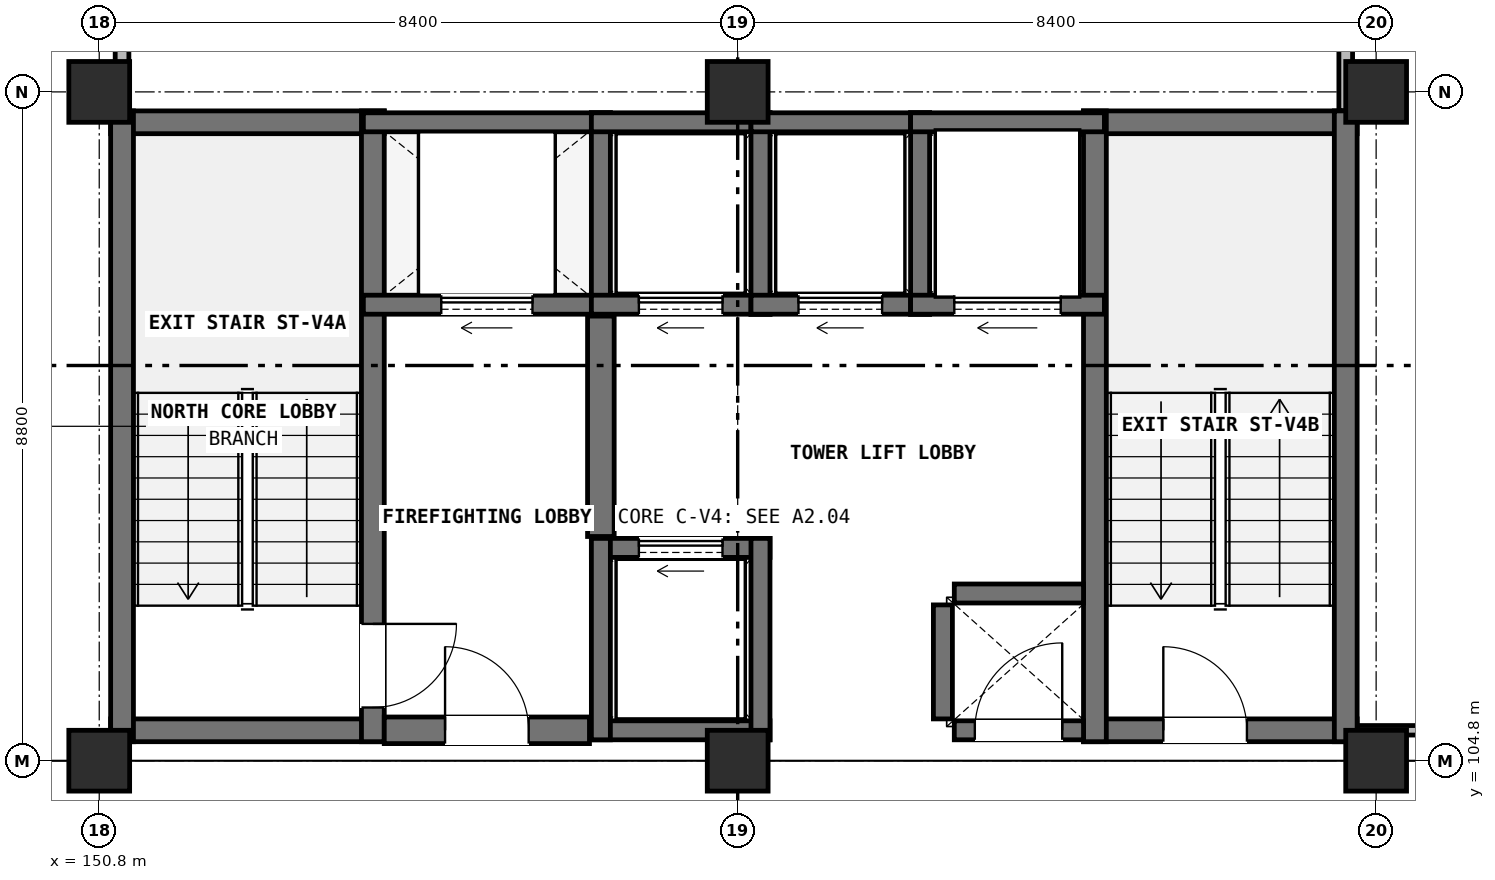
"""IFC4 building model, lengths in metres.
Left out: names, types, materials, properties, quantities, classifications, styles, units other than length and angle.
Written with IfcOpenShell. Run it as: python <this file> out.ifc"""

import sys

from ifc_helpers import new_model, si_unit, direction, frame, frame_2d, origin, origin_2d, place, context, subcontext, project, spatial, rectangle, extrude, element, fill, save


model = new_model("IFC4")
c1 = context("Model", 3, precision=1e-05, world=origin(), true_north=direction((0.0, 1.0)))
c2 = subcontext(c1, "Body", "Model", "MODEL_VIEW")
j1 = project(units=[si_unit("LENGTHUNIT", "METRE"), si_unit("PLANEANGLEUNIT", "RADIAN")], contexts=[c1])
p1 = place(None, origin())
s1 = spatial("IfcSite", under=j1, at=p1, CompositionType="ELEMENT")
p2 = place(p1, origin())
s2 = spatial("IfcBuilding", under=s1, at=p2, CompositionType="ELEMENT")
p3 = place(p2, frame((0.0, 0.0, 17.2)))
s3 = spatial("IfcBuildingStorey", under=s2, at=p3, CompositionType="ELEMENT", Elevation=17.2)
for number, where, z_axis, x_axis in (
    (1, (150.8, 104.8, 0.0), (0.0, 0.0, 1.0), (1.0, 0.0, 0.0)),
    (2, (150.8, 113.6, 0.0), (0.0, 0.0, 1.0), (1.0, 0.0, 0.0)),
    (3, (159.2, 104.8, 0.0), (0.0, 0.0, 1.0), (1.0, 0.0, 0.0)),
    (4, (159.2, 113.6, 0.0), (0.0, 0.0, 1.0), (1.0, 0.0, 0.0)),
    (5, (167.6, 104.8, 0.0), (0.0, 0.0, 1.0), (1.0, 0.0, 0.0)),
    (6, (167.6, 113.6, 0.0), (0.0, 0.0, 1.0), (1.0, 0.0, 0.0)),
):
    element("IfcColumn", number, at=place(p3, frame(where, z_axis=z_axis, x_axis=x_axis)), inside=s3, PredefinedType="COLUMN", context=c2, shape_type="SweptSolid", body=[
        extrude(rectangle(XDim=0.8, YDim=0.8, at=origin_2d()), origin(), (0.0, 0.0, 1.0), 3.8),
    ])
for number, where, z_axis, x_axis in (
    (7, (150.95, 105.2, 0.0), (0.0, 0.0, 1.0), (1.0, 0.0, 0.0)),
    (8, (150.95, 113.2, 0.0), (0.0, 0.0, 1.0), (1.0, 0.0, 0.0)),
):
    element("IfcWall", number, at=place(p3, frame(where, z_axis=z_axis, x_axis=x_axis)), inside=s3, PredefinedType="SHEAR", context=c2, shape_type="SweptSolid", body=[
        extrude(rectangle(XDim=3.6, YDim=0.3, at=frame_2d((1.8, 0.0))), origin(), (0.0, 0.0, 1.0), 3.8),
    ])
p4 = place(p3, frame((151.1, 105.05, 0.0), z_axis=(0.0, 0.0, 1.0), x_axis=(0.0, 1.0, 0.0)))
e9 = element("IfcWall", 9, at=p4, inside=s3, PredefinedType="SHEAR", context=c2, shape_type="SweptSolid", body=[
    extrude(rectangle(XDim=8.3, YDim=0.3, at=frame_2d((4.15, 0.0))), origin(), (0.0, 0.0, 1.0), 3.8),
])
p5 = place(p3, frame((154.4, 105.05, 0.0), z_axis=(0.0, 0.0, 1.0), x_axis=(0.0, 1.0, 0.0)))
e10 = element("IfcWall", 10, at=p5, inside=s3, PredefinedType="SHEAR", context=c2, shape_type="SweptSolid", body=[
    extrude(rectangle(XDim=8.3, YDim=0.3, at=frame_2d((4.15, 0.0))), origin(), (0.0, 0.0, 1.0), 3.8),
])
p6 = place(p5, frame((0.45, 0.0, 0.0)))
e11 = element("IfcOpeningElement", 11, at=p6, cuts=e10, PredefinedType="OPENING", context=c2, shape_type="SweptSolid", body=[
    extrude(rectangle(XDim=1.1, YDim=2.2, at=frame_2d((0.55, 1.1))), frame((0.0, 0.16, 0.0), z_axis=(0.0, -1.0, 0.0), x_axis=(1.0, 0.0, 0.0)), (0.0, 0.0, 1.0), 0.32),
])
p7 = place(p3, frame((163.75, 105.2, 0.0), z_axis=(0.0, 0.0, 1.0), x_axis=(1.0, 0.0, 0.0)))
e12 = element("IfcWall", 12, at=p7, inside=s3, PredefinedType="SHEAR", context=c2, shape_type="SweptSolid", body=[
    extrude(rectangle(XDim=3.6, YDim=0.3, at=frame_2d((1.8, 0.0))), origin(), (0.0, 0.0, 1.0), 3.8),
])
p8 = place(p7, frame((1.05, 0.0, 0.0)))
e13 = element("IfcOpeningElement", 13, at=p8, cuts=e12, PredefinedType="OPENING", context=c2, shape_type="SweptSolid", body=[
    extrude(rectangle(XDim=1.1, YDim=2.2, at=frame_2d((0.55, 1.1))), frame((0.0, 0.16, 0.0), z_axis=(0.0, -1.0, 0.0), x_axis=(1.0, 0.0, 0.0)), (0.0, 0.0, 1.0), 0.32),
])
p9 = place(p3, frame((163.75, 113.2, 0.0), z_axis=(0.0, 0.0, 1.0), x_axis=(1.0, 0.0, 0.0)))
e14 = element("IfcWall", 14, at=p9, inside=s3, PredefinedType="SHEAR", context=c2, shape_type="SweptSolid", body=[
    extrude(rectangle(XDim=3.6, YDim=0.3, at=frame_2d((1.8, 0.0))), origin(), (0.0, 0.0, 1.0), 3.8),
])
for number, where, z_axis, x_axis in (
    (15, (163.9, 105.05, 0.0), (0.0, 0.0, 1.0), (0.0, 1.0, 0.0)),
    (16, (167.2, 105.05, 0.0), (0.0, 0.0, 1.0), (0.0, 1.0, 0.0)),
):
    element("IfcWall", number, at=place(p3, frame(where, z_axis=z_axis, x_axis=x_axis)), inside=s3, PredefinedType="SHEAR", context=c2, shape_type="SweptSolid", body=[
        extrude(rectangle(XDim=8.3, YDim=0.3, at=frame_2d((4.15, 0.0))), origin(), (0.0, 0.0, 1.0), 3.8),
    ])
p10 = place(p3, frame((154.275, 110.8, 0.0), z_axis=(0.0, 0.0, 1.0), x_axis=(1.0, 0.0, 0.0)))
e17 = element("IfcWall", 17, at=p10, inside=s3, PredefinedType="SOLIDWALL", context=c2, shape_type="SweptSolid", body=[
    extrude(rectangle(XDim=3.25, YDim=0.25, at=frame_2d((1.625, 0.0))), origin(), (0.0, 0.0, 1.0), 3.48),
])
p11 = place(p10, frame((1.025, 0.0, 0.0)))
e18 = element("IfcOpeningElement", 18, at=p11, cuts=e17, PredefinedType="OPENING", context=c2, shape_type="SweptSolid", body=[
    extrude(rectangle(XDim=1.2, YDim=2.2, at=frame_2d((0.6, 1.1))), frame((0.0, 0.135, 0.0), z_axis=(0.0, -1.0, 0.0), x_axis=(1.0, 0.0, 0.0)), (0.0, 0.0, 1.0), 0.27),
])
p12 = place(p3, frame((154.275, 113.2, 0.0), z_axis=(0.0, 0.0, 1.0), x_axis=(1.0, 0.0, 0.0)))
e19 = element("IfcWall", 19, at=p12, inside=s3, PredefinedType="SOLIDWALL", context=c2, shape_type="SweptSolid", body=[
    extrude(rectangle(XDim=3.25, YDim=0.25, at=frame_2d((1.625, 0.0))), origin(), (0.0, 0.0, 1.0), 3.48),
])
p13 = place(p3, frame((157.4, 110.675, 0.0), z_axis=(0.0, 0.0, 1.0), x_axis=(0.0, 1.0, 0.0)))
e20 = element("IfcWall", 20, at=p13, inside=s3, PredefinedType="SOLIDWALL", context=c2, shape_type="SweptSolid", body=[
    extrude(rectangle(XDim=2.65, YDim=0.25, at=frame_2d((1.325, 0.0))), origin(), (0.0, 0.0, 1.0), 3.48),
])
p14 = place(p3, frame((157.275, 110.8, 0.0), z_axis=(0.0, 0.0, 1.0), x_axis=(1.0, 0.0, 0.0)))
e21 = element("IfcWall", 21, at=p14, inside=s3, PredefinedType="SOLIDWALL", context=c2, shape_type="SweptSolid", body=[
    extrude(rectangle(XDim=2.35, YDim=0.25, at=frame_2d((1.175, 0.0))), origin(), (0.0, 0.0, 1.0), 3.48),
])
p15 = place(p14, frame((0.625, 0.0, 0.0)))
e22 = element("IfcOpeningElement", 22, at=p15, cuts=e21, PredefinedType="OPENING", context=c2, shape_type="SweptSolid", body=[
    extrude(rectangle(XDim=1.1, YDim=2.2, at=frame_2d((0.55, 1.1))), frame((0.0, 0.135, 0.0), z_axis=(0.0, -1.0, 0.0), x_axis=(1.0, 0.0, 0.0)), (0.0, 0.0, 1.0), 0.27),
])
p16 = place(p3, frame((157.275, 113.2, 0.0), z_axis=(0.0, 0.0, 1.0), x_axis=(1.0, 0.0, 0.0)))
e23 = element("IfcWall", 23, at=p16, inside=s3, PredefinedType="SOLIDWALL", context=c2, shape_type="SweptSolid", body=[
    extrude(rectangle(XDim=2.35, YDim=0.25, at=frame_2d((1.175, 0.0))), origin(), (0.0, 0.0, 1.0), 3.48),
])
p17 = place(p3, frame((159.5, 110.675, 0.0), z_axis=(0.0, 0.0, 1.0), x_axis=(0.0, 1.0, 0.0)))
e24 = element("IfcWall", 24, at=p17, inside=s3, PredefinedType="SOLIDWALL", context=c2, shape_type="SweptSolid", body=[
    extrude(rectangle(XDim=2.65, YDim=0.25, at=frame_2d((1.325, 0.0))), origin(), (0.0, 0.0, 1.0), 3.48),
])
p18 = place(p3, frame((159.375, 110.8, 0.0), z_axis=(0.0, 0.0, 1.0), x_axis=(1.0, 0.0, 0.0)))
e25 = element("IfcWall", 25, at=p18, inside=s3, PredefinedType="SOLIDWALL", context=c2, shape_type="SweptSolid", body=[
    extrude(rectangle(XDim=2.35, YDim=0.25, at=frame_2d((1.175, 0.0))), origin(), (0.0, 0.0, 1.0), 3.48),
])
p19 = place(p18, frame((0.625, 0.0, 0.0)))
e26 = element("IfcOpeningElement", 26, at=p19, cuts=e25, PredefinedType="OPENING", context=c2, shape_type="SweptSolid", body=[
    extrude(rectangle(XDim=1.1, YDim=2.2, at=frame_2d((0.55, 1.1))), frame((0.0, 0.135, 0.0), z_axis=(0.0, -1.0, 0.0), x_axis=(1.0, 0.0, 0.0)), (0.0, 0.0, 1.0), 0.27),
])
p20 = place(p3, frame((159.375, 113.2, 0.0), z_axis=(0.0, 0.0, 1.0), x_axis=(1.0, 0.0, 0.0)))
e27 = element("IfcWall", 27, at=p20, inside=s3, PredefinedType="SOLIDWALL", context=c2, shape_type="SweptSolid", body=[
    extrude(rectangle(XDim=2.35, YDim=0.25, at=frame_2d((1.175, 0.0))), origin(), (0.0, 0.0, 1.0), 3.48),
])
p21 = place(p3, frame((161.6, 110.675, 0.0), z_axis=(0.0, 0.0, 1.0), x_axis=(0.0, 1.0, 0.0)))
e28 = element("IfcWall", 28, at=p21, inside=s3, PredefinedType="SOLIDWALL", context=c2, shape_type="SweptSolid", body=[
    extrude(rectangle(XDim=2.65, YDim=0.25, at=frame_2d((1.325, 0.0))), origin(), (0.0, 0.0, 1.0), 3.48),
])
p22 = place(p3, frame((157.275, 105.2, 0.0), z_axis=(0.0, 0.0, 1.0), x_axis=(1.0, 0.0, 0.0)))
e29 = element("IfcWall", 29, at=p22, inside=s3, PredefinedType="SOLIDWALL", context=c2, shape_type="SweptSolid", body=[
    extrude(rectangle(XDim=2.35, YDim=0.25, at=frame_2d((1.175, 0.0))), origin(), (0.0, 0.0, 1.0), 3.48),
])
p23 = place(p3, frame((157.275, 107.6, 0.0), z_axis=(0.0, 0.0, 1.0), x_axis=(1.0, 0.0, 0.0)))
e30 = element("IfcWall", 30, at=p23, inside=s3, PredefinedType="SOLIDWALL", context=c2, shape_type="SweptSolid", body=[
    extrude(rectangle(XDim=2.35, YDim=0.25, at=frame_2d((1.175, 0.0))), origin(), (0.0, 0.0, 1.0), 3.48),
])
p24 = place(p23, frame((0.625, 0.0, 0.0)))
e31 = element("IfcOpeningElement", 31, at=p24, cuts=e30, PredefinedType="OPENING", context=c2, shape_type="SweptSolid", body=[
    extrude(rectangle(XDim=1.1, YDim=2.2, at=frame_2d((0.55, 1.1))), frame((0.0, 0.135, 0.0), z_axis=(0.0, -1.0, 0.0), x_axis=(1.0, 0.0, 0.0)), (0.0, 0.0, 1.0), 0.27),
])
for number, where, z_axis, x_axis in (
    (32, (157.4, 105.075, 0.0), (0.0, 0.0, 1.0), (0.0, 1.0, 0.0)),
    (33, (159.5, 105.075, 0.0), (0.0, 0.0, 1.0), (0.0, 1.0, 0.0)),
):
    element("IfcWall", number, at=place(p3, frame(where, z_axis=z_axis, x_axis=x_axis)), inside=s3, PredefinedType="SOLIDWALL", context=c2, shape_type="SweptSolid", body=[
        extrude(rectangle(XDim=2.65, YDim=0.25, at=frame_2d((1.325, 0.0))), origin(), (0.0, 0.0, 1.0), 3.48),
    ])
p25 = place(p3, frame((161.475, 110.8, 0.0), z_axis=(0.0, 0.0, 1.0), x_axis=(1.0, 0.0, 0.0)))
e34 = element("IfcWall", 34, at=p25, inside=s3, PredefinedType="SOLIDWALL", context=c2, shape_type="SweptSolid", body=[
    extrude(rectangle(XDim=2.55, YDim=0.25, at=frame_2d((1.275, 0.0))), origin(), (0.0, 0.0, 1.0), 3.48),
])
p26 = place(p25, frame((0.575, 0.0, 0.0)))
e35 = element("IfcOpeningElement", 35, at=p26, cuts=e34, PredefinedType="OPENING", context=c2, shape_type="SweptSolid", body=[
    extrude(rectangle(XDim=1.4, YDim=2.3, at=frame_2d((0.7, 1.15))), frame((0.0, 0.135, 0.0), z_axis=(0.0, -1.0, 0.0), x_axis=(1.0, 0.0, 0.0)), (0.0, 0.0, 1.0), 0.27),
])
p27 = place(p3, frame((161.475, 113.2, 0.0), z_axis=(0.0, 0.0, 1.0), x_axis=(1.0, 0.0, 0.0)))
e36 = element("IfcWall", 36, at=p27, inside=s3, PredefinedType="SOLIDWALL", context=c2, shape_type="SweptSolid", body=[
    extrude(rectangle(XDim=2.55, YDim=0.25, at=frame_2d((1.275, 0.0))), origin(), (0.0, 0.0, 1.0), 3.48),
])
p28 = place(p3, frame((157.4, 107.75, 0.0), z_axis=(0.0, 0.0, 1.0), x_axis=(0.0, 1.0, 0.0)))
e37 = element("IfcWall", 37, at=p28, inside=s3, PredefinedType="SHEAR", context=c2, shape_type="SweptSolid", body=[
    extrude(rectangle(XDim=2.9, YDim=0.35, at=frame_2d((1.45, 0.0))), origin(), (0.0, 0.0, 1.0), 3.48),
])
p29 = place(p3, frame((154.55, 105.2, 0.0), z_axis=(0.0, 0.0, 1.0), x_axis=(1.0, 0.0, 0.0)))
e38 = element("IfcWall", 38, at=p29, inside=s3, PredefinedType="SHEAR", context=c2, shape_type="SweptSolid", body=[
    extrude(rectangle(XDim=2.7, YDim=0.35, at=frame_2d((1.35, 0.0))), origin(), (0.0, 0.0, 1.0), 3.48),
])
p30 = place(p29, frame((0.8, 0.0, 0.0)))
e39 = element("IfcOpeningElement", 39, at=p30, cuts=e38, PredefinedType="OPENING", context=c2, shape_type="SweptSolid", body=[
    extrude(rectangle(XDim=1.1, YDim=2.2, at=frame_2d((0.55, 1.1))), frame((0.0, 0.185, 0.0), z_axis=(0.0, -1.0, 0.0), x_axis=(1.0, 0.0, 0.0)), (0.0, 0.0, 1.0), 0.37),
])
p31 = place(p3, frame((161.9, 105.35, 0.0), z_axis=(0.0, 0.0, 1.0), x_axis=(0.0, 1.0, 0.0)))
e40 = element("IfcWall", 40, at=p31, inside=s3, PredefinedType="SOLIDWALL", context=c2, shape_type="SweptSolid", body=[
    extrude(rectangle(XDim=1.5, YDim=0.25, at=frame_2d((0.75, 0.0))), origin(), (0.0, 0.0, 1.0), 3.48),
])
p32 = place(p3, frame((162.05, 107.0, 0.0), z_axis=(0.0, 0.0, 1.0), x_axis=(1.0, 0.0, 0.0)))
e41 = element("IfcWall", 41, at=p32, inside=s3, PredefinedType="SOLIDWALL", context=c2, shape_type="SweptSolid", body=[
    extrude(rectangle(XDim=1.7, YDim=0.25, at=frame_2d((0.85, 0.0))), origin(), (0.0, 0.0, 1.0), 3.48),
])
p33 = place(p3, frame((162.05, 105.2, 0.0), z_axis=(0.0, 0.0, 1.0), x_axis=(1.0, 0.0, 0.0)))
e42 = element("IfcWall", 42, at=p33, inside=s3, PredefinedType="SOLIDWALL", context=c2, shape_type="SweptSolid", body=[
    extrude(rectangle(XDim=1.7, YDim=0.25, at=frame_2d((0.85, 0.0))), origin(), (0.0, 0.0, 1.0), 3.48),
])
p34 = place(p33, frame((0.27, 0.0, 0.0)))
e43 = element("IfcOpeningElement", 43, at=p34, cuts=e42, PredefinedType="OPENING", context=c2, shape_type="SweptSolid", body=[
    extrude(rectangle(XDim=1.15, YDim=2.2, at=frame_2d((0.575, 1.1))), frame((0.0, 0.135, 0.0), z_axis=(0.0, -1.0, 0.0), x_axis=(1.0, 0.0, 0.0)), (0.0, 0.0, 1.0), 0.27),
])
p35 = place(p3, frame((167.355, 105.2, 0.0), z_axis=(0.0, 0.0, 1.0), x_axis=(1.0, 0.0, 0.0)))
e44 = element("IfcWall", 44, at=p35, inside=s3, PredefinedType="PARTITIONING", context=c2, shape_type="SweptSolid", body=[
    extrude(rectangle(XDim=4.245, YDim=0.125, at=frame_2d((2.123, 0.0))), origin(), (0.0, 0.0, 1.0), 3.045),
])
p36 = place(p35, frame((1.633, 0.0, 0.0)))
e45 = element("IfcOpeningElement", 45, at=p36, cuts=e44, PredefinedType="OPENING", context=c2, shape_type="SweptSolid", body=[
    extrude(rectangle(XDim=0.98, YDim=2.1, at=frame_2d((0.49, 1.05))), frame((0.0, 0.073, 0.0), z_axis=(0.0, -1.0, 0.0), x_axis=(1.0, 0.0, 0.0)), (0.0, 0.0, 1.0), 0.145),
])
p37 = place(p3, frame((151.1, 113.355, 0.0), z_axis=(0.0, 0.0, 1.0), x_axis=(0.0, 1.0, 0.0)))
e46 = element("IfcWall", 46, at=p37, inside=s3, PredefinedType="PARTITIONING", context=c2, shape_type="SweptSolid", body=[
    extrude(rectangle(XDim=6.045, YDim=0.18, at=frame_2d((3.022, 0.0))), origin(), (0.0, 0.0, 1.0), 3.045),
])
p38 = place(p37, frame((2.333, 0.0, 0.0)))
e47 = element("IfcOpeningElement", 47, at=p38, cuts=e46, PredefinedType="OPENING", context=c2, shape_type="SweptSolid", body=[
    extrude(rectangle(XDim=1.38, YDim=2.2, at=frame_2d((0.69, 1.1))), frame((0.0, 0.1, 0.0), z_axis=(0.0, -1.0, 0.0), x_axis=(1.0, 0.0, 0.0)), (0.0, 0.0, 1.0), 0.2),
])
p39 = place(p3, frame((167.2, 113.355, 0.0), z_axis=(0.0, 0.0, 1.0), x_axis=(0.0, 1.0, 0.0)))
e48 = element("IfcWall", 48, at=p39, inside=s3, PredefinedType="PARTITIONING", context=c2, shape_type="SweptSolid", body=[
    extrude(rectangle(XDim=8.645, YDim=0.18, at=frame_2d((4.323, 0.0))), origin(), (0.0, 0.0, 1.0), 3.045),
])
p40 = place(p6, frame((1.1, 0.0, 0.0), z_axis=(0.0, 0.0, 1.0), x_axis=(-1.0, 0.0, 0.0)))
e49 = element("IfcDoor", 49, at=p40, inside=s3, OperationType="SINGLE_SWING_RIGHT", PredefinedType="DOOR", context=c2, shape_type="SweptSolid", body=[
    extrude(rectangle(XDim=1.1, YDim=2.2, at=frame_2d((0.55, 1.1))), frame((0.0, 0.025, 0.0), z_axis=(0.0, -1.0, 0.0), x_axis=(1.0, 0.0, 0.0)), (0.0, 0.0, 1.0), 0.05),
])
fill(e11, e49)
p41 = place(p8, origin())
e50 = element("IfcDoor", 50, at=p41, inside=s3, OperationType="SINGLE_SWING_LEFT", PredefinedType="DOOR", context=c2, shape_type="SweptSolid", body=[
    extrude(rectangle(XDim=1.1, YDim=2.2, at=frame_2d((0.55, 1.1))), frame((0.0, 0.025, 0.0), z_axis=(0.0, -1.0, 0.0), x_axis=(1.0, 0.0, 0.0)), (0.0, 0.0, 1.0), 0.05),
])
fill(e13, e50)
p42 = place(p11, origin())
e51 = element("IfcDoor", 51, at=p42, inside=s3, OperationType="SLIDING_TO_LEFT", PredefinedType="DOOR", context=c2, shape_type="SweptSolid", body=[
    extrude(rectangle(XDim=1.2, YDim=2.2, at=frame_2d((0.6, 1.1))), frame((0.0, 0.025, 0.0), z_axis=(0.0, -1.0, 0.0), x_axis=(1.0, 0.0, 0.0)), (0.0, 0.0, 1.0), 0.05),
])
fill(e18, e51)
p43 = place(p15, origin())
e52 = element("IfcDoor", 52, at=p43, inside=s3, OperationType="SLIDING_TO_LEFT", PredefinedType="DOOR", context=c2, shape_type="SweptSolid", body=[
    extrude(rectangle(XDim=1.1, YDim=2.2, at=frame_2d((0.55, 1.1))), frame((0.0, 0.025, 0.0), z_axis=(0.0, -1.0, 0.0), x_axis=(1.0, 0.0, 0.0)), (0.0, 0.0, 1.0), 0.05),
])
fill(e22, e52)
p44 = place(p19, origin())
e53 = element("IfcDoor", 53, at=p44, inside=s3, OperationType="SLIDING_TO_LEFT", PredefinedType="DOOR", context=c2, shape_type="SweptSolid", body=[
    extrude(rectangle(XDim=1.1, YDim=2.2, at=frame_2d((0.55, 1.1))), frame((0.0, 0.025, 0.0), z_axis=(0.0, -1.0, 0.0), x_axis=(1.0, 0.0, 0.0)), (0.0, 0.0, 1.0), 0.05),
])
fill(e26, e53)
p45 = place(p24, origin())
e54 = element("IfcDoor", 54, at=p45, inside=s3, OperationType="SLIDING_TO_LEFT", PredefinedType="DOOR", context=c2, shape_type="SweptSolid", body=[
    extrude(rectangle(XDim=1.1, YDim=2.2, at=frame_2d((0.55, 1.1))), frame((0.0, 0.025, 0.0), z_axis=(0.0, -1.0, 0.0), x_axis=(1.0, 0.0, 0.0)), (0.0, 0.0, 1.0), 0.05),
])
fill(e31, e54)
p46 = place(p26, origin())
e55 = element("IfcDoor", 55, at=p46, inside=s3, OperationType="SLIDING_TO_LEFT", PredefinedType="DOOR", context=c2, shape_type="SweptSolid", body=[
    extrude(rectangle(XDim=1.4, YDim=2.3, at=frame_2d((0.7, 1.15))), frame((0.0, 0.025, 0.0), z_axis=(0.0, -1.0, 0.0), x_axis=(1.0, 0.0, 0.0)), (0.0, 0.0, 1.0), 0.05),
])
fill(e35, e55)
p47 = place(p30, origin())
e56 = element("IfcDoor", 56, at=p47, inside=s3, OperationType="SINGLE_SWING_LEFT", PredefinedType="DOOR", context=c2, shape_type="SweptSolid", body=[
    extrude(rectangle(XDim=1.1, YDim=2.2, at=frame_2d((0.55, 1.1))), frame((0.0, 0.025, 0.0), z_axis=(0.0, -1.0, 0.0), x_axis=(1.0, 0.0, 0.0)), (0.0, 0.0, 1.0), 0.05),
])
fill(e39, e56)
p48 = place(p34, origin())
e57 = element("IfcDoor", 57, at=p48, inside=s3, OperationType="SINGLE_SWING_RIGHT", PredefinedType="DOOR", context=c2, shape_type="SweptSolid", body=[
    extrude(rectangle(XDim=1.15, YDim=2.2, at=frame_2d((0.575, 1.1))), frame((0.0, 0.025, 0.0), z_axis=(0.0, -1.0, 0.0), x_axis=(1.0, 0.0, 0.0)), (0.0, 0.0, 1.0), 0.05),
])
fill(e43, e57)
save(model, sys.argv[1])
